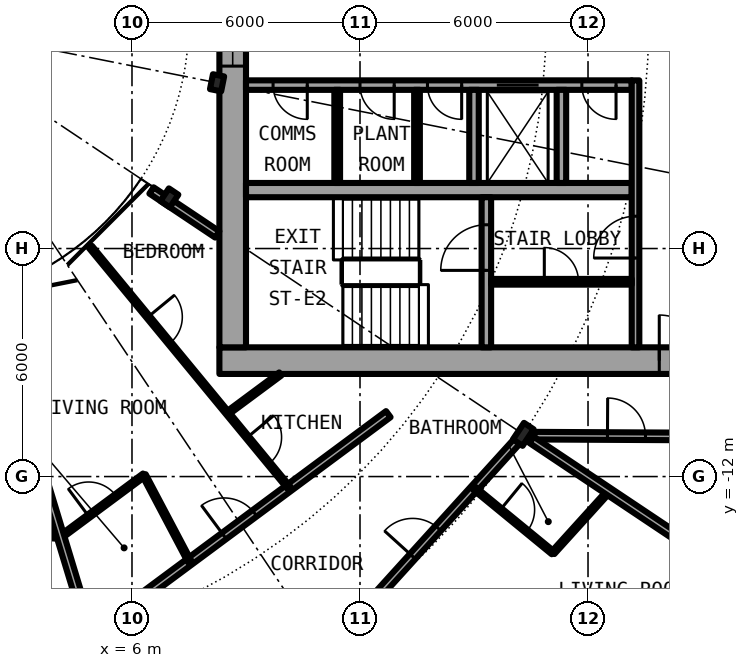
"""IFC4 building model, lengths in metres.
Left out: names, types, materials, properties, quantities, classifications, styles, units other than length and angle.
Written with IfcOpenShell. Run it as: python <this file> out.ifc"""

import sys

from ifc_helpers import new_model, si_unit, direction, frame, frame_2d, origin, origin_2d, place, context, subcontext, project, spatial, rectangle, i_section, extrude, element, fill, save


model = new_model("IFC4")
c1 = context("Model", 3, precision=1e-05, world=origin(), true_north=direction((0.0, 1.0)))
c2 = subcontext(c1, "Body", "Model", "MODEL_VIEW")
j1 = project(units=[si_unit("LENGTHUNIT", "METRE"), si_unit("PLANEANGLEUNIT", "RADIAN")], contexts=[c1])
p1 = place(None, origin())
s1 = spatial("IfcSite", under=j1, at=p1, CompositionType="ELEMENT")
p2 = place(p1, origin())
s2 = spatial("IfcBuilding", under=s1, at=p2, CompositionType="ELEMENT")
p3 = place(p2, frame((0.0, 0.0, 75.8)))
s3 = spatial("IfcBuildingStorey", under=s2, at=p3, CompositionType="ELEMENT", Elevation=75.8)
p4 = place(p3, frame((16.297, -10.889, 0.0), z_axis=(0.0, 0.0, 1.0), x_axis=(0.831469612303, -0.55557023302, 0.0)))
e1 = element("IfcColumn", 1, at=p4, inside=s3, PredefinedType="COLUMN", context=c2, shape_type="SweptSolid", body=[
    extrude(i_section(OverallWidth=0.306, OverallDepth=0.524, WebThickness=0.021, FlangeThickness=0.04, FilletRadius=0.027, at=origin_2d()), origin(), (0.0, 0.0, 1.0), 3.05),
])
for number, where, z_axis, x_axis in (
    (2, (6.984, -4.667, 0.0), (0.0, 0.0, 1.0), (0.831, -0.556, 0.0)),
    (3, (8.239, -1.639, 0.0), (0.0, 0.0, 1.0), (0.981, -0.195, 0.0)),
):
    element("IfcColumn", number, at=place(p3, frame(where, z_axis=z_axis, x_axis=x_axis)), inside=s3, PredefinedType="COLUMN", context=c2, shape_type="SweptSolid", body=[
        extrude(i_section(OverallWidth=0.3, OverallDepth=0.4, WebThickness=0.013, FlangeThickness=0.024, FilletRadius=0.027, at=origin_2d()), origin(), (0.0, 0.0, 1.0), 3.05),
    ])
p5 = place(p3, frame((8.3, -8.95, 0.0), z_axis=(0.0, 0.0, 1.0), x_axis=(1.0, 0.0, 0.0)))
e4 = element("IfcWall", 4, at=p5, inside=s3, PredefinedType="SHEAR", context=c2, shape_type="SweptSolid", body=[
    extrude(rectangle(XDim=14.0, YDim=0.7, at=frame_2d((7.0, 0.0))), origin(), (0.0, 0.0, 1.0), 3.05),
])
p6 = place(p5, frame((11.575, 0.0, 0.0)))
e5 = element("IfcOpeningElement", 5, at=p6, cuts=e4, PredefinedType="OPENING", context=c2, shape_type="SweptSolid", body=[
    extrude(rectangle(XDim=1.2, YDim=2.3, at=frame_2d((0.6, 1.15))), frame((0.0, 0.36, 0.0), z_axis=(0.0, -1.0, 0.0), x_axis=(1.0, 0.0, 0.0)), (0.0, 0.0, 1.0), 0.72),
])
p7 = place(p3, frame((8.65, -8.6, 0.0), z_axis=(0.0, 0.0, 1.0), x_axis=(0.0, 1.0, 0.0)))
e6 = element("IfcWall", 6, at=p7, inside=s3, PredefinedType="SHEAR", context=c2, shape_type="SweptSolid", body=[
    extrude(rectangle(XDim=17.2, YDim=0.7, at=frame_2d((8.6, 0.0))), origin(), (0.0, 0.0, 1.0), 3.05),
])
p8 = place(p7, frame((7.4, 0.0, 0.1)))
e7 = element("IfcOpeningElement", 7, at=p8, cuts=e6, PredefinedType="OPENING", context=c2, shape_type="SweptSolid", body=[
    extrude(rectangle(XDim=2.4, YDim=2.2, at=frame_2d((1.2, 1.1))), frame((0.0, 0.36, 0.0), z_axis=(0.0, -1.0, 0.0), x_axis=(1.0, 0.0, 0.0)), (0.0, 0.0, 1.0), 0.72),
])
p9 = place(p3, frame((19.15, -1.7, 0.0), z_axis=(0.0, 0.0, 1.0), x_axis=(-1.0, 0.0, 0.0)))
e8 = element("IfcWall", 8, at=p9, inside=s3, PredefinedType="SHEAR", context=c2, shape_type="SweptSolid", body=[
    extrude(rectangle(XDim=10.15, YDim=0.25, at=frame_2d((5.075, 0.0))), origin(), (0.0, 0.0, 1.0), 3.05),
])
p10 = place(p9, frame((2.45, 0.0, 0.0)))
e9 = element("IfcOpeningElement", 9, at=p10, cuts=e8, PredefinedType="OPENING", context=c2, shape_type="SweptSolid", body=[
    extrude(rectangle(XDim=1.1, YDim=2.3, at=frame_2d((0.55, 1.15))), frame((0.0, 0.135, 0.0), z_axis=(0.0, -1.0, 0.0), x_axis=(1.0, 0.0, 0.0)), (0.0, 0.0, 1.0), 0.27),
])
p11 = place(p9, frame((8.538, 0.0, 0.0)))
e10 = element("IfcOpeningElement", 10, at=p11, cuts=e8, PredefinedType="OPENING", context=c2, shape_type="SweptSolid", body=[
    extrude(rectangle(XDim=0.9, YDim=2.3, at=frame_2d((0.45, 1.15))), frame((0.0, 0.135, 0.0), z_axis=(0.0, -1.0, 0.0), x_axis=(1.0, 0.0, 0.0)), (0.0, 0.0, 1.0), 0.27),
])
p12 = place(p9, frame((6.25, 0.0, 0.0)))
e11 = element("IfcOpeningElement", 11, at=p12, cuts=e8, PredefinedType="OPENING", context=c2, shape_type="SweptSolid", body=[
    extrude(rectangle(XDim=0.9, YDim=2.3, at=frame_2d((0.45, 1.15))), frame((0.0, 0.135, 0.0), z_axis=(0.0, -1.0, 0.0), x_axis=(1.0, 0.0, 0.0)), (0.0, 0.0, 1.0), 0.27),
])
p13 = place(p9, frame((4.475, 0.0, 0.0)))
e12 = element("IfcOpeningElement", 12, at=p13, cuts=e8, PredefinedType="OPENING", context=c2, shape_type="SweptSolid", body=[
    extrude(rectangle(XDim=0.9, YDim=2.3, at=frame_2d((0.45, 1.15))), frame((0.0, 0.135, 0.0), z_axis=(0.0, -1.0, 0.0), x_axis=(1.0, 0.0, 0.0)), (0.0, 0.0, 1.0), 0.27),
])
p14 = place(p9, frame((0.413, 0.0, 0.0)))
e13 = element("IfcOpeningElement", 13, at=p14, cuts=e8, PredefinedType="OPENING", context=c2, shape_type="SweptSolid", body=[
    extrude(rectangle(XDim=0.9, YDim=2.3, at=frame_2d((0.45, 1.15))), frame((0.0, 0.135, 0.0), z_axis=(0.0, -1.0, 0.0), x_axis=(1.0, 0.0, 0.0)), (0.0, 0.0, 1.0), 0.27),
])
p15 = place(p3, frame((9.0, -4.462, 0.0), z_axis=(0.0, 0.0, 1.0), x_axis=(1.0, 0.0, 0.0)))
e14 = element("IfcWall", 14, at=p15, inside=s3, PredefinedType="SHEAR", context=c2, shape_type="SweptSolid", body=[
    extrude(rectangle(XDim=10.15, YDim=0.375, at=frame_2d((5.075, 0.0))), origin(), (0.0, 0.0, 1.0), 3.05),
])
p16 = place(p3, frame((15.325, -8.6, 0.0), z_axis=(0.0, 0.0, 1.0), x_axis=(0.0, 1.0, 0.0)))
e15 = element("IfcWall", 15, at=p16, inside=s3, PredefinedType="SHEAR", context=c2, shape_type="SweptSolid", body=[
    extrude(rectangle(XDim=3.95, YDim=0.25, at=frame_2d((1.975, 0.0))), origin(), (0.0, 0.0, 1.0), 3.05),
])
p17 = place(p16, frame((2.025, 0.0, 0.0)))
e16 = element("IfcOpeningElement", 16, at=p17, cuts=e15, PredefinedType="OPENING", context=c2, shape_type="SweptSolid", body=[
    extrude(rectangle(XDim=1.2, YDim=2.3, at=frame_2d((0.6, 1.15))), frame((0.0, 0.135, 0.0), z_axis=(0.0, -1.0, 0.0), x_axis=(1.0, 0.0, 0.0)), (0.0, 0.0, 1.0), 0.27),
])
for number, where, z_axis, x_axis in (
    (17, (15.0, -1.825, 0.0), (0.0, 0.0, 1.0), (0.0, -1.0, 0.0)),
    (18, (17.3, -1.825, 0.0), (0.0, 0.0, 1.0), (0.0, -1.0, 0.0)),
):
    element("IfcWall", number, at=place(p3, frame(where, z_axis=z_axis, x_axis=x_axis)), inside=s3, PredefinedType="SOLIDWALL", context=c2, shape_type="SweptSolid", body=[
        extrude(rectangle(XDim=2.45, YDim=0.25, at=frame_2d((1.225, 0.0))), origin(), (0.0, 0.0, 1.0), 2.7),
    ])
p18 = place(p3, frame((19.25, -8.6, 0.0), z_axis=(0.0, 0.0, 1.0), x_axis=(0.0, 1.0, 0.0)))
e19 = element("IfcWall", 19, at=p18, inside=s3, PredefinedType="SOLIDWALL", context=c2, shape_type="SweptSolid", body=[
    extrude(rectangle(XDim=7.025, YDim=0.2, at=frame_2d((3.513, 0.0))), origin(), (0.0, 0.0, 1.0), 2.7),
])
p19 = place(p18, frame((2.35, 0.0, 0.0)))
e20 = element("IfcOpeningElement", 20, at=p19, cuts=e19, PredefinedType="OPENING", context=c2, shape_type="SweptSolid", body=[
    extrude(rectangle(XDim=1.1, YDim=2.3, at=frame_2d((0.55, 1.15))), frame((0.0, 0.11, 0.0), z_axis=(0.0, -1.0, 0.0), x_axis=(1.0, 0.0, 0.0)), (0.0, 0.0, 1.0), 0.22),
])
for number, where, z_axis, x_axis in (
    (21, (11.4, -1.825, 0.0), (0.0, 0.0, 1.0), (0.0, -1.0, 0.0)),
    (22, (13.5, -1.825, 0.0), (0.0, 0.0, 1.0), (0.0, -1.0, 0.0)),
):
    element("IfcWall", number, at=place(p3, frame(where, z_axis=z_axis, x_axis=x_axis)), inside=s3, PredefinedType="PARTITIONING", context=c2, shape_type="SweptSolid", body=[
        extrude(rectangle(XDim=2.45, YDim=0.15, at=frame_2d((1.225, 0.0))), origin(), (0.0, 0.0, 1.0), 2.7),
    ])
p20 = place(p3, frame((15.45, -6.875, 0.0), z_axis=(0.0, 0.0, 1.0), x_axis=(1.0, 0.0, 0.0)))
e23 = element("IfcWall", 23, at=p20, inside=s3, PredefinedType="PARTITIONING", context=c2, shape_type="SweptSolid", body=[
    extrude(rectangle(XDim=3.7, YDim=0.15, at=frame_2d((1.85, 0.0))), origin(), (0.0, 0.0, 1.0), 2.7),
])
p21 = place(p20, frame((1.4, 0.0, 0.0)))
e24 = element("IfcOpeningElement", 24, at=p21, cuts=e23, PredefinedType="OPENING", context=c2, shape_type="SweptSolid", body=[
    extrude(rectangle(XDim=0.9, YDim=2.3, at=frame_2d((0.45, 1.15))), frame((0.0, 0.085, 0.0), z_axis=(0.0, -1.0, 0.0), x_axis=(1.0, 0.0, 0.0)), (0.0, 0.0, 1.0), 0.17),
])
p22 = place(p3, frame((17.077, -14.006, 0.0), z_axis=(0.0, 0.0, 1.0), x_axis=(0.671396556615, 0.741098282123, 0.0)))
e25 = element("IfcWall", 25, at=p22, inside=s3, PredefinedType="PARTITIONING", context=c2, shape_type="SweptSolid", body=[
    extrude(rectangle(XDim=2.182, YDim=0.1, at=frame_2d((1.091, 0.0))), origin(), (0.0, 0.0, 1.0), 2.7),
])
p23 = place(p3, frame((12.434, -15.151, 0.0), z_axis=(0.0, 0.0, 1.0), x_axis=(0.671601747072, 0.740912338492, 0.0)))
e26 = element("IfcWall", 26, at=p23, inside=s3, PredefinedType="PARTITIONING", context=c2, shape_type="SweptSolid", body=[
    extrude(rectangle(XDim=5.597, YDim=0.2, at=frame_2d((2.799, 0.0))), origin(), (0.0, 0.0, 1.0), 2.38),
])
p24 = place(p23, frame((1.417, 0.0, 0.0)))
e27 = element("IfcOpeningElement", 27, at=p24, cuts=e26, PredefinedType="OPENING", context=c2, shape_type="SweptSolid", body=[
    extrude(rectangle(XDim=1.0, YDim=2.3, at=frame_2d((0.5, 1.15))), frame((0.0, 0.11, 0.0), z_axis=(0.0, -1.0, 0.0), x_axis=(1.0, 0.0, 0.0)), (0.0, 0.0, 1.0), 0.22),
])
p25 = place(p3, frame((4.906, -16.172, 0.0), z_axis=(0.0, 0.0, 1.0), x_axis=(0.803191461888, 0.595720971219, 0.0)))
e28 = element("IfcWall", 28, at=p25, inside=s3, PredefinedType="PARTITIONING", context=c2, shape_type="SweptSolid", body=[
    extrude(rectangle(XDim=9.76, YDim=0.2, at=frame_2d((4.88, 0.0))), origin(), (0.0, 0.0, 1.0), 2.7),
])
p26 = place(p25, frame((4.38, 0.0, 0.0)))
e29 = element("IfcOpeningElement", 29, at=p26, cuts=e28, PredefinedType="OPENING", context=c2, shape_type="SweptSolid", body=[
    extrude(rectangle(XDim=1.0, YDim=2.3, at=frame_2d((0.5, 1.15))), frame((0.0, 0.11, 0.0), z_axis=(0.0, -1.0, 0.0), x_axis=(1.0, 0.0, 0.0)), (0.0, 0.0, 1.0), 0.22),
])
p27 = place(p3, frame((1.397, -13.454, 0.0), z_axis=(0.0, 0.0, 1.0), x_axis=(0.99880129942, -0.048948588095, 0.0)))
e30 = element("IfcWall", 30, at=p27, inside=s3, PredefinedType="PARTITIONING", context=c2, shape_type="SweptSolid", body=[
    extrude(rectangle(XDim=2.733, YDim=0.1, at=frame_2d((1.367, 0.0))), origin(), (0.0, 0.0, 1.0), 2.7),
])
p28 = place(p27, frame((0.912, 0.0, 0.0)))
e31 = element("IfcOpeningElement", 31, at=p28, cuts=e30, PredefinedType="OPENING", context=c2, shape_type="SweptSolid", body=[
    extrude(rectangle(XDim=0.9, YDim=2.3, at=frame_2d((0.45, 1.15))), frame((0.0, 0.06, 0.0), z_axis=(0.0, -1.0, 0.0), x_axis=(1.0, 0.0, 0.0)), (0.0, 0.0, 1.0), 0.12),
])
p29 = place(p3, frame((4.123, -13.589, 0.0), z_axis=(0.0, 0.0, 1.0), x_axis=(0.803128348509, 0.595806055542, 0.0)))
e32 = element("IfcWall", 32, at=p29, inside=s3, PredefinedType="PARTITIONING", context=c2, shape_type="SweptSolid", body=[
    extrude(rectangle(XDim=2.734, YDim=0.1, at=frame_2d((1.367, 0.0))), origin(), (0.0, 0.0, 1.0), 2.7),
])
p30 = place(p29, frame((0.916, 0.0, 0.0)))
e33 = element("IfcOpeningElement", 33, at=p30, cuts=e32, PredefinedType="OPENING", context=c2, shape_type="SweptSolid", body=[
    extrude(rectangle(XDim=0.9, YDim=2.3, at=frame_2d((0.45, 1.15))), frame((0.0, 0.06, 0.0), z_axis=(0.0, -1.0, 0.0), x_axis=(1.0, 0.0, 0.0)), (0.0, 0.0, 1.0), 0.12),
])
p31 = place(p3, frame((8.513, -10.332, 0.0), z_axis=(0.0, 0.0, 1.0), x_axis=(0.803135014325, 0.595797070121, 0.0)))
e34 = element("IfcWall", 34, at=p31, inside=s3, PredefinedType="PARTITIONING", context=c2, shape_type="SweptSolid", body=[
    extrude(rectangle(XDim=1.732, YDim=0.1, at=frame_2d((0.866, 0.0))), origin(), (0.0, 0.0, 1.0), 2.7),
])
p32 = place(p3, frame((16.589, -10.924, 0.0), z_axis=(0.0, 0.0, 1.0), x_axis=(0.999987054722, -0.005088259783, 0.0)))
e35 = element("IfcWall", 35, at=p32, inside=s3, PredefinedType="PARTITIONING", context=c2, shape_type="SweptSolid", body=[
    extrude(rectangle(XDim=5.086, YDim=0.2, at=frame_2d((2.543, 0.0))), origin(), (0.0, 0.0, 1.0), 2.7),
])
p33 = place(p32, frame((1.923, 0.0, 0.0)))
e36 = element("IfcOpeningElement", 36, at=p33, cuts=e35, PredefinedType="OPENING", context=c2, shape_type="SweptSolid", body=[
    extrude(rectangle(XDim=1.0, YDim=2.3, at=frame_2d((0.5, 1.15))), frame((0.0, 0.11, 0.0), z_axis=(0.0, -1.0, 0.0), x_axis=(1.0, 0.0, 0.0)), (0.0, 0.0, 1.0), 0.22),
])
p34 = place(p3, frame((6.513, -4.472, 0.0), z_axis=(0.0, 0.0, 1.0), x_axis=(0.831382204863, -0.555701025225, 0.0)))
e37 = element("IfcWall", 37, at=p34, inside=s3, PredefinedType="PARTITIONING", context=c2, shape_type="SweptSolid", body=[
    extrude(rectangle(XDim=2.082, YDim=0.2, at=frame_2d((1.041, 0.0))), origin(), (0.0, 0.0, 1.0), 2.7),
])
p35 = place(p3, frame((2.24, -7.388, 0.0), z_axis=(0.0, 0.0, 1.0), x_axis=(0.290420725025, -0.956899055531, 0.0)))
e38 = element("IfcWall", 38, at=p35, inside=s3, PredefinedType="PARTITIONING", context=c2, shape_type="SweptSolid", body=[
    extrude(rectangle(XDim=9.18, YDim=0.2, at=frame_2d((4.59, 0.0))), origin(), (0.0, 0.0, 1.0), 2.7),
])
p36 = place(p3, frame((4.908, -5.959, 0.0), z_axis=(0.0, 0.0, 1.0), x_axis=(0.636105207978, -0.771602335652, 0.0)))
e39 = element("IfcWall", 39, at=p36, inside=s3, PredefinedType="PARTITIONING", context=c2, shape_type="SweptSolid", body=[
    extrude(rectangle(XDim=8.213, YDim=0.1, at=frame_2d((4.106, 0.0))), origin(), (0.0, 0.0, 1.0), 2.7),
])
p37 = place(p36, frame((6.49, 0.0, 0.0)))
e40 = element("IfcOpeningElement", 40, at=p37, cuts=e39, PredefinedType="OPENING", context=c2, shape_type="SweptSolid", body=[
    extrude(rectangle(XDim=0.9, YDim=2.3, at=frame_2d((0.45, 1.15))), frame((0.0, 0.06, 0.0), z_axis=(0.0, -1.0, 0.0), x_axis=(1.0, 0.0, 0.0)), (0.0, 0.0, 1.0), 0.12),
])
p38 = place(p36, frame((2.384, 0.0, 0.0)))
e41 = element("IfcOpeningElement", 41, at=p38, cuts=e39, PredefinedType="OPENING", context=c2, shape_type="SweptSolid", body=[
    extrude(rectangle(XDim=0.9, YDim=2.3, at=frame_2d((0.45, 1.15))), frame((0.0, 0.06, 0.0), z_axis=(0.0, -1.0, 0.0), x_axis=(1.0, 0.0, 0.0)), (0.0, 0.0, 1.0), 0.12),
])
p39 = place(p3, frame((6.316, -11.961, 0.0), z_axis=(0.0, 0.0, 1.0), x_axis=(0.467037016128, -0.884237765291, 0.0)))
e42 = element("IfcWall", 42, at=p39, inside=s3, PredefinedType="PARTITIONING", context=c2, shape_type="SweptSolid", body=[
    extrude(rectangle(XDim=2.572, YDim=0.1, at=frame_2d((1.286, 0.0))), origin(), (0.0, 0.0, 1.0), 2.7),
])
p40 = place(p3, frame((15.009, -12.31, 0.0), z_axis=(0.0, 0.0, 1.0), x_axis=(0.77319617123, -0.634166918717, 0.0)))
e43 = element("IfcWall", 43, at=p40, inside=s3, PredefinedType="PARTITIONING", context=c2, shape_type="SweptSolid", body=[
    extrude(rectangle(XDim=2.675, YDim=0.1, at=frame_2d((1.337, 0.0))), origin(), (0.0, 0.0, 1.0), 2.7),
])
p41 = place(p40, frame((0.887, 0.0, 0.0)))
e44 = element("IfcOpeningElement", 44, at=p41, cuts=e43, PredefinedType="OPENING", context=c2, shape_type="SweptSolid", body=[
    extrude(rectangle(XDim=0.9, YDim=2.3, at=frame_2d((0.45, 1.15))), frame((0.0, 0.06, 0.0), z_axis=(0.0, -1.0, 0.0), x_axis=(1.0, 0.0, 0.0)), (0.0, 0.0, 1.0), 0.12),
])
p42 = place(p3, frame((16.515, -11.035, 0.0), z_axis=(0.0, 0.0, 1.0), x_axis=(0.831505405283, -0.555516661303, 0.0)))
e45 = element("IfcWall", 45, at=p42, inside=s3, PredefinedType="PARTITIONING", context=c2, shape_type="SweptSolid", body=[
    extrude(rectangle(XDim=7.312, YDim=0.2, at=frame_2d((3.656, 0.0))), origin(), (0.0, 0.0, 1.0), 2.7),
])
p43 = place(p10, origin())
e46 = element("IfcDoor", 46, at=p43, inside=s3, OperationType="DOUBLE_DOOR_SLIDING", PredefinedType="DOOR", context=c2, shape_type="SweptSolid", body=[
    extrude(rectangle(XDim=1.1, YDim=2.3, at=frame_2d((0.55, 1.15))), frame((0.0, 0.025, 0.0), z_axis=(0.0, -1.0, 0.0), x_axis=(1.0, 0.0, 0.0)), (0.0, 0.0, 1.0), 0.05),
])
fill(e9, e46)
p44 = place(p11, origin())
e47 = element("IfcDoor", 47, at=p44, inside=s3, OperationType="SINGLE_SWING_LEFT", PredefinedType="DOOR", context=c2, shape_type="SweptSolid", body=[
    extrude(rectangle(XDim=0.9, YDim=2.3, at=frame_2d((0.45, 1.15))), frame((0.0, 0.025, 0.0), z_axis=(0.0, -1.0, 0.0), x_axis=(1.0, 0.0, 0.0)), (0.0, 0.0, 1.0), 0.05),
])
fill(e10, e47)
p45 = place(p12, origin())
e48 = element("IfcDoor", 48, at=p45, inside=s3, OperationType="SINGLE_SWING_LEFT", PredefinedType="DOOR", context=c2, shape_type="SweptSolid", body=[
    extrude(rectangle(XDim=0.9, YDim=2.3, at=frame_2d((0.45, 1.15))), frame((0.0, 0.025, 0.0), z_axis=(0.0, -1.0, 0.0), x_axis=(1.0, 0.0, 0.0)), (0.0, 0.0, 1.0), 0.05),
])
fill(e11, e48)
p46 = place(p13, origin())
e49 = element("IfcDoor", 49, at=p46, inside=s3, OperationType="SINGLE_SWING_RIGHT", PredefinedType="DOOR", context=c2, shape_type="SweptSolid", body=[
    extrude(rectangle(XDim=0.9, YDim=2.3, at=frame_2d((0.45, 1.15))), frame((0.0, 0.025, 0.0), z_axis=(0.0, -1.0, 0.0), x_axis=(1.0, 0.0, 0.0)), (0.0, 0.0, 1.0), 0.05),
])
fill(e12, e49)
p47 = place(p14, origin())
e50 = element("IfcDoor", 50, at=p47, inside=s3, OperationType="SINGLE_SWING_RIGHT", PredefinedType="DOOR", context=c2, shape_type="SweptSolid", body=[
    extrude(rectangle(XDim=0.9, YDim=2.3, at=frame_2d((0.45, 1.15))), frame((0.0, 0.025, 0.0), z_axis=(0.0, -1.0, 0.0), x_axis=(1.0, 0.0, 0.0)), (0.0, 0.0, 1.0), 0.05),
])
fill(e13, e50)
p48 = place(p21, origin())
e51 = element("IfcDoor", 51, at=p48, inside=s3, OperationType="SINGLE_SWING_LEFT", PredefinedType="DOOR", context=c2, shape_type="SweptSolid", body=[
    extrude(rectangle(XDim=0.9, YDim=2.3, at=frame_2d((0.45, 1.15))), frame((0.0, 0.025, 0.0), z_axis=(0.0, -1.0, 0.0), x_axis=(1.0, 0.0, 0.0)), (0.0, 0.0, 1.0), 0.05),
])
fill(e24, e51)
p49 = place(p17, origin())
e52 = element("IfcDoor", 52, at=p49, inside=s3, OperationType="SINGLE_SWING_LEFT", PredefinedType="DOOR", context=c2, shape_type="SweptSolid", body=[
    extrude(rectangle(XDim=1.2, YDim=2.3, at=frame_2d((0.6, 1.15))), frame((0.0, 0.025, 0.0), z_axis=(0.0, -1.0, 0.0), x_axis=(1.0, 0.0, 0.0)), (0.0, 0.0, 1.0), 0.05),
])
fill(e16, e52)
p50 = place(p19, origin())
e53 = element("IfcDoor", 53, at=p50, inside=s3, OperationType="SINGLE_SWING_RIGHT", PredefinedType="DOOR", context=c2, shape_type="SweptSolid", body=[
    extrude(rectangle(XDim=1.1, YDim=2.3, at=frame_2d((0.55, 1.15))), frame((0.0, 0.025, 0.0), z_axis=(0.0, -1.0, 0.0), x_axis=(1.0, 0.0, 0.0)), (0.0, 0.0, 1.0), 0.05),
])
fill(e20, e53)
p51 = place(p6, origin())
e54 = element("IfcDoor", 54, at=p51, inside=s3, OperationType="SINGLE_SWING_LEFT", PredefinedType="DOOR", context=c2, shape_type="SweptSolid", body=[
    extrude(rectangle(XDim=1.2, YDim=2.3, at=frame_2d((0.6, 1.15))), frame((0.0, 0.025, 0.0), z_axis=(0.0, -1.0, 0.0), x_axis=(1.0, 0.0, 0.0)), (0.0, 0.0, 1.0), 0.05),
])
fill(e5, e54)
p52 = place(p8, origin())
e55 = element("IfcWindow", 55, at=p52, inside=s3, PartitioningType="SINGLE_PANEL", PredefinedType="WINDOW", context=c2, shape_type="SweptSolid", body=[
    extrude(rectangle(XDim=2.4, YDim=2.2, at=frame_2d((1.2, 1.1))), frame((0.0, 0.03, 0.0), z_axis=(0.0, -1.0, 0.0), x_axis=(1.0, 0.0, 0.0)), (0.0, 0.0, 1.0), 0.06),
])
fill(e7, e55)
p53 = place(p24, origin())
e56 = element("IfcDoor", 56, at=p53, inside=s3, OperationType="SINGLE_SWING_LEFT", PredefinedType="DOOR", context=c2, shape_type="SweptSolid", body=[
    extrude(rectangle(XDim=1.0, YDim=2.3, at=frame_2d((0.5, 1.15))), frame((0.0, 0.025, 0.0), z_axis=(0.0, -1.0, 0.0), x_axis=(1.0, 0.0, 0.0)), (0.0, 0.0, 1.0), 0.05),
])
fill(e27, e56)
p54 = place(p41, origin())
e57 = element("IfcDoor", 57, at=p54, inside=s3, OperationType="SINGLE_SWING_RIGHT", PredefinedType="DOOR", context=c2, shape_type="SweptSolid", body=[
    extrude(rectangle(XDim=0.9, YDim=2.3, at=frame_2d((0.45, 1.15))), frame((0.0, 0.025, 0.0), z_axis=(0.0, -1.0, 0.0), x_axis=(1.0, 0.0, 0.0)), (0.0, 0.0, 1.0), 0.05),
])
fill(e44, e57)
p55 = place(p26, origin())
e58 = element("IfcDoor", 58, at=p55, inside=s3, OperationType="SINGLE_SWING_LEFT", PredefinedType="DOOR", context=c2, shape_type="SweptSolid", body=[
    extrude(rectangle(XDim=1.0, YDim=2.3, at=frame_2d((0.5, 1.15))), frame((0.0, 0.025, 0.0), z_axis=(0.0, -1.0, 0.0), x_axis=(1.0, 0.0, 0.0)), (0.0, 0.0, 1.0), 0.05),
])
fill(e29, e58)
p56 = place(p30, origin())
e59 = element("IfcDoor", 59, at=p56, inside=s3, OperationType="SINGLE_SWING_LEFT", PredefinedType="DOOR", context=c2, shape_type="SweptSolid", body=[
    extrude(rectangle(XDim=0.9, YDim=2.3, at=frame_2d((0.45, 1.15))), frame((0.0, 0.025, 0.0), z_axis=(0.0, -1.0, 0.0), x_axis=(1.0, 0.0, 0.0)), (0.0, 0.0, 1.0), 0.05),
])
fill(e33, e59)
p57 = place(p37, origin())
e60 = element("IfcDoor", 60, at=p57, inside=s3, OperationType="SINGLE_SWING_RIGHT", PredefinedType="DOOR", context=c2, shape_type="SweptSolid", body=[
    extrude(rectangle(XDim=0.9, YDim=2.3, at=frame_2d((0.45, 1.15))), frame((0.0, 0.025, 0.0), z_axis=(0.0, -1.0, 0.0), x_axis=(1.0, 0.0, 0.0)), (0.0, 0.0, 1.0), 0.05),
])
fill(e40, e60)
p58 = place(p38, origin())
e61 = element("IfcDoor", 61, at=p58, inside=s3, OperationType="SINGLE_SWING_LEFT", PredefinedType="DOOR", context=c2, shape_type="SweptSolid", body=[
    extrude(rectangle(XDim=0.9, YDim=2.3, at=frame_2d((0.45, 1.15))), frame((0.0, 0.025, 0.0), z_axis=(0.0, -1.0, 0.0), x_axis=(1.0, 0.0, 0.0)), (0.0, 0.0, 1.0), 0.05),
])
fill(e41, e61)
p59 = place(p33, origin())
e62 = element("IfcDoor", 62, at=p59, inside=s3, OperationType="SINGLE_SWING_LEFT", PredefinedType="DOOR", context=c2, shape_type="SweptSolid", body=[
    extrude(rectangle(XDim=1.0, YDim=2.3, at=frame_2d((0.5, 1.15))), frame((0.0, 0.025, 0.0), z_axis=(0.0, -1.0, 0.0), x_axis=(1.0, 0.0, 0.0)), (0.0, 0.0, 1.0), 0.05),
])
fill(e36, e62)
save(model, sys.argv[1])
